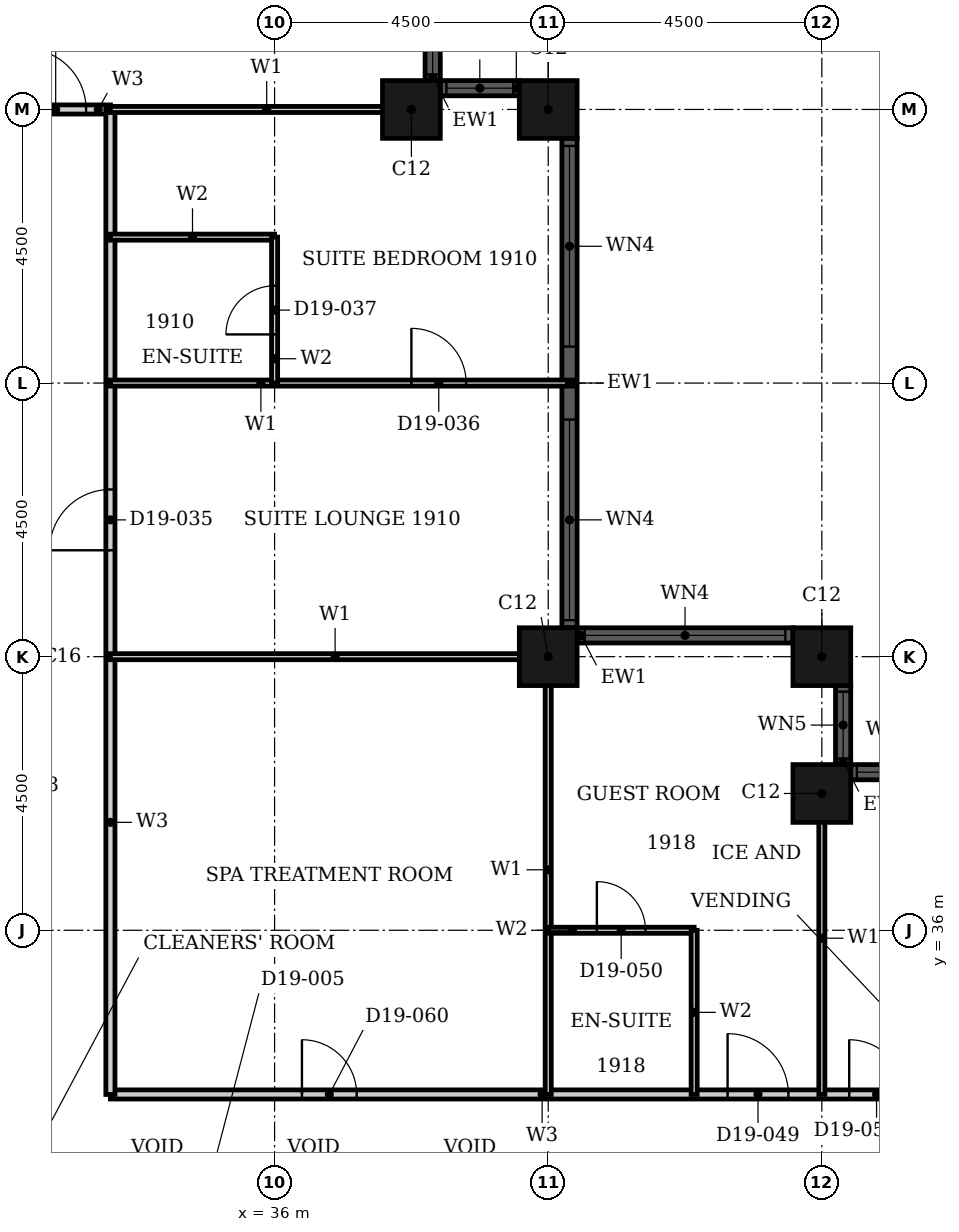
"""IFC4 building model, lengths in metres.
Left out: names, types, materials, properties, quantities, classifications, styles, units other than length and angle.
Written with IfcOpenShell. Run it as: python <this file> out.ifc"""

import sys

from ifc_helpers import new_model, si_unit, direction, frame, frame_2d, origin, origin_2d, place, context, subcontext, project, spatial, rectangle, hollow_rectangle, extrude, element, fill, save


model = new_model("IFC4")
c1 = context("Model", 3, precision=1e-05, world=origin(), true_north=direction((0.0, 1.0)))
c2 = subcontext(c1, "Body", "Model", "MODEL_VIEW")
j1 = project(units=[si_unit("LENGTHUNIT", "METRE"), si_unit("PLANEANGLEUNIT", "RADIAN")], contexts=[c1])
p1 = place(None, origin())
s1 = spatial("IfcSite", under=j1, at=p1, CompositionType="ELEMENT")
p2 = place(p1, origin())
s2 = spatial("IfcBuilding", under=s1, at=p2, CompositionType="ELEMENT")
p3 = place(p2, frame((0.0, 0.0, 81.6)))
s3 = spatial("IfcBuildingStorey", under=s2, at=p3, CompositionType="ELEMENT", Elevation=81.6)
for number, where, z_axis, x_axis in (
    (1, (45.0, 38.25, 0.0), (0.0, 0.0, 1.0), (1.0, 0.0, 0.0)),
    (2, (45.0, 40.5, 0.0), (0.0, 0.0, 1.0), (1.0, 0.0, 0.0)),
    (3, (40.5, 40.5, 0.0), (0.0, 0.0, 1.0), (1.0, 0.0, 0.0)),
    (4, (40.5, 49.5, 0.0), (0.0, 0.0, 1.0), (1.0, 0.0, 0.0)),
    (5, (38.25, 49.5, 0.0), (0.0, 0.0, 1.0), (1.0, 0.0, 0.0)),
):
    element("IfcColumn", number, at=place(p3, frame(where, z_axis=z_axis, x_axis=x_axis)), inside=s3, PredefinedType="COLUMN", context=c2, shape_type="SweptSolid", body=[
        extrude(hollow_rectangle(XDim=0.95, YDim=0.95, WallThickness=0.03, at=origin_2d()), origin(), (0.0, 0.0, 1.0), 3.6),
    ])
p4 = place(p3, frame((46.775, 38.6, 0.0), z_axis=(0.0, 0.0, 1.0), x_axis=(-1.0, 0.0, 0.0)))
e6 = element("IfcWall", 6, at=p4, inside=s3, PredefinedType="SOLIDWALL", context=c2, shape_type="SweptSolid", body=[
    extrude(rectangle(XDim=1.3, YDim=0.25, at=frame_2d((0.65, 0.0))), origin(), (0.0, 0.0, 1.0), 3.6),
])
p5 = place(p4, frame((0.1, 0.0, 0.9)))
e7 = element("IfcOpeningElement", 7, at=p5, cuts=e6, PredefinedType="OPENING", context=c2, shape_type="SweptSolid", body=[
    extrude(rectangle(XDim=1.1, YDim=2.08, at=frame_2d((0.55, 1.04))), frame((0.0, 0.135, 0.0), z_axis=(0.0, -1.0, 0.0), x_axis=(1.0, 0.0, 0.0)), (0.0, 0.0, 1.0), 0.27),
])
p6 = place(p3, frame((45.35, 38.725, 0.0), z_axis=(0.0, 0.0, 1.0), x_axis=(0.0, 1.0, 0.0)))
e8 = element("IfcWall", 8, at=p6, inside=s3, PredefinedType="SOLIDWALL", context=c2, shape_type="SweptSolid", body=[
    extrude(rectangle(XDim=1.3, YDim=0.25, at=frame_2d((0.65, 0.0))), origin(), (0.0, 0.0, 1.0), 3.6),
])
p7 = place(p6, frame((0.1, 0.0, 0.9)))
e9 = element("IfcOpeningElement", 9, at=p7, cuts=e8, PredefinedType="OPENING", context=c2, shape_type="SweptSolid", body=[
    extrude(rectangle(XDim=1.1, YDim=2.08, at=frame_2d((0.55, 1.04))), frame((0.0, 0.135, 0.0), z_axis=(0.0, -1.0, 0.0), x_axis=(1.0, 0.0, 0.0)), (0.0, 0.0, 1.0), 0.27),
])
p8 = place(p3, frame((44.525, 40.85, 0.0), z_axis=(0.0, 0.0, 1.0), x_axis=(-1.0, 0.0, 0.0)))
e10 = element("IfcWall", 10, at=p8, inside=s3, PredefinedType="SOLIDWALL", context=c2, shape_type="SweptSolid", body=[
    extrude(rectangle(XDim=3.55, YDim=0.25, at=frame_2d((1.775, 0.0))), origin(), (0.0, 0.0, 1.0), 3.6),
])
p9 = place(p8, frame((0.125, 0.0, 0.9)))
e11 = element("IfcOpeningElement", 11, at=p9, cuts=e10, PredefinedType="OPENING", context=c2, shape_type="SweptSolid", body=[
    extrude(rectangle(XDim=3.3, YDim=2.08, at=frame_2d((1.65, 1.04))), frame((0.0, 0.135, 0.0), z_axis=(0.0, -1.0, 0.0), x_axis=(1.0, 0.0, 0.0)), (0.0, 0.0, 1.0), 0.27),
])
p10 = place(p3, frame((40.85, 40.975, 0.0), z_axis=(0.0, 0.0, 1.0), x_axis=(0.0, 1.0, 0.0)))
e12 = element("IfcWall", 12, at=p10, inside=s3, PredefinedType="SOLIDWALL", context=c2, shape_type="SweptSolid", body=[
    extrude(rectangle(XDim=8.05, YDim=0.25, at=frame_2d((4.025, 0.0))), origin(), (0.0, 0.0, 1.0), 3.6),
])
p11 = place(p10, frame((0.125, 0.0, 0.9)))
e13 = element("IfcOpeningElement", 13, at=p11, cuts=e12, PredefinedType="OPENING", context=c2, shape_type="SweptSolid", body=[
    extrude(rectangle(XDim=3.3, YDim=2.08, at=frame_2d((1.65, 1.04))), frame((0.0, 0.135, 0.0), z_axis=(0.0, -1.0, 0.0), x_axis=(1.0, 0.0, 0.0)), (0.0, 0.0, 1.0), 0.27),
])
p12 = place(p10, frame((4.625, 0.0, 0.9)))
e14 = element("IfcOpeningElement", 14, at=p12, cuts=e12, PredefinedType="OPENING", context=c2, shape_type="SweptSolid", body=[
    extrude(rectangle(XDim=3.3, YDim=2.08, at=frame_2d((1.65, 1.04))), frame((0.0, 0.135, 0.0), z_axis=(0.0, -1.0, 0.0), x_axis=(1.0, 0.0, 0.0)), (0.0, 0.0, 1.0), 0.27),
])
p13 = place(p3, frame((40.025, 49.85, 0.0), z_axis=(0.0, 0.0, 1.0), x_axis=(-1.0, 0.0, 0.0)))
e15 = element("IfcWall", 15, at=p13, inside=s3, PredefinedType="SOLIDWALL", context=c2, shape_type="SweptSolid", body=[
    extrude(rectangle(XDim=1.3, YDim=0.25, at=frame_2d((0.65, 0.0))), origin(), (0.0, 0.0, 1.0), 3.6),
])
p14 = place(p13, frame((0.1, 0.0, 0.9)))
e16 = element("IfcOpeningElement", 16, at=p14, cuts=e15, PredefinedType="OPENING", context=c2, shape_type="SweptSolid", body=[
    extrude(rectangle(XDim=1.1, YDim=2.08, at=frame_2d((0.55, 1.04))), frame((0.0, 0.135, 0.0), z_axis=(0.0, -1.0, 0.0), x_axis=(1.0, 0.0, 0.0)), (0.0, 0.0, 1.0), 0.27),
])
p15 = place(p3, frame((38.6, 49.975, 0.0), z_axis=(0.0, 0.0, 1.0), x_axis=(0.0, 1.0, 0.0)))
e17 = element("IfcWall", 17, at=p15, inside=s3, PredefinedType="SOLIDWALL", context=c2, shape_type="SweptSolid", body=[
    extrude(rectangle(XDim=1.3, YDim=0.25, at=frame_2d((0.65, 0.0))), origin(), (0.0, 0.0, 1.0), 3.6),
])
p16 = place(p15, frame((0.1, 0.0, 0.9)))
e18 = element("IfcOpeningElement", 18, at=p16, cuts=e17, PredefinedType="OPENING", context=c2, shape_type="SweptSolid", body=[
    extrude(rectangle(XDim=1.1, YDim=2.08, at=frame_2d((0.55, 1.04))), frame((0.0, 0.135, 0.0), z_axis=(0.0, -1.0, 0.0), x_axis=(1.0, 0.0, 0.0)), (0.0, 0.0, 1.0), 0.27),
])
p17 = place(p3, frame((33.3, 33.3, 0.0), z_axis=(0.0, 0.0, 1.0), x_axis=(1.0, 0.0, 0.0)))
e19 = element("IfcWall", 19, at=p17, inside=s3, PredefinedType="PARTITIONING", context=c2, shape_type="SweptSolid", body=[
    extrude(rectangle(XDim=13.5, YDim=0.15, at=frame_2d((6.75, 0.0))), origin(), (0.0, 0.0, 1.0), 3.3),
])
p18 = place(p17, frame((10.15, 0.0, 0.0)))
e20 = element("IfcOpeningElement", 20, at=p18, cuts=e19, PredefinedType="OPENING", context=c2, shape_type="SweptSolid", body=[
    extrude(rectangle(XDim=1.0, YDim=2.1, at=frame_2d((0.5, 1.05))), frame((0.0, 0.085, 0.0), z_axis=(0.0, -1.0, 0.0), x_axis=(1.0, 0.0, 0.0)), (0.0, 0.0, 1.0), 0.17),
])
p19 = place(p17, frame((12.15, 0.0, 0.0)))
e21 = element("IfcOpeningElement", 21, at=p19, cuts=e19, PredefinedType="OPENING", context=c2, shape_type="SweptSolid", body=[
    extrude(rectangle(XDim=0.9, YDim=2.1, at=frame_2d((0.45, 1.05))), frame((0.0, 0.085, 0.0), z_axis=(0.0, -1.0, 0.0), x_axis=(1.0, 0.0, 0.0)), (0.0, 0.0, 1.0), 0.17),
])
p20 = place(p17, frame((3.15, 0.0, 0.0)))
e22 = element("IfcOpeningElement", 22, at=p20, cuts=e19, PredefinedType="OPENING", context=c2, shape_type="SweptSolid", body=[
    extrude(rectangle(XDim=0.9, YDim=2.1, at=frame_2d((0.45, 1.05))), frame((0.0, 0.085, 0.0), z_axis=(0.0, -1.0, 0.0), x_axis=(1.0, 0.0, 0.0)), (0.0, 0.0, 1.0), 0.17),
])
p21 = place(p3, frame((31.5, 49.5, 0.0), z_axis=(0.0, 0.0, 1.0), x_axis=(1.0, 0.0, 0.0)))
e23 = element("IfcWall", 23, at=p21, inside=s3, PredefinedType="PARTITIONING", context=c2, shape_type="SweptSolid", body=[
    extrude(rectangle(XDim=1.8, YDim=0.15, at=frame_2d((0.9, 0.0))), origin(), (0.0, 0.0, 1.0), 3.3),
])
p22 = place(p21, frame((0.4, 0.0, 0.0)))
e24 = element("IfcOpeningElement", 24, at=p22, cuts=e23, PredefinedType="OPENING", context=c2, shape_type="SweptSolid", body=[
    extrude(rectangle(XDim=1.0, YDim=2.1, at=frame_2d((0.5, 1.05))), frame((0.0, 0.085, 0.0), z_axis=(0.0, -1.0, 0.0), x_axis=(1.0, 0.0, 0.0)), (0.0, 0.0, 1.0), 0.17),
])
p23 = place(p3, frame((33.3, 33.3, 0.0), z_axis=(0.0, 0.0, 1.0), x_axis=(0.0, 1.0, 0.0)))
e25 = element("IfcWall", 25, at=p23, inside=s3, PredefinedType="PARTITIONING", context=c2, shape_type="SweptSolid", body=[
    extrude(rectangle(XDim=16.2, YDim=0.15, at=frame_2d((8.1, 0.0))), origin(), (0.0, 0.0, 1.0), 3.3),
])
p24 = place(p23, frame((8.95, 0.0, 0.0)))
e26 = element("IfcOpeningElement", 26, at=p24, cuts=e25, PredefinedType="OPENING", context=c2, shape_type="SweptSolid", body=[
    extrude(rectangle(XDim=1.0, YDim=2.1, at=frame_2d((0.5, 1.05))), frame((0.0, 0.085, 0.0), z_axis=(0.0, -1.0, 0.0), x_axis=(1.0, 0.0, 0.0)), (0.0, 0.0, 1.0), 0.17),
])
p25 = place(p3, frame((33.3, 40.5, 0.0), z_axis=(0.0, 0.0, 1.0), x_axis=(1.0, 0.0, 0.0)))
e27 = element("IfcWall", 27, at=p25, inside=s3, PredefinedType="PARTITIONING", context=c2, shape_type="SweptSolid", body=[
    extrude(rectangle(XDim=7.39, YDim=0.1, at=frame_2d((3.695, 0.0))), origin(), (0.0, 0.0, 1.0), 2.38),
])
p26 = place(p3, frame((33.3, 45.0, 0.0), z_axis=(0.0, 0.0, 1.0), x_axis=(1.0, 0.0, 0.0)))
e28 = element("IfcWall", 28, at=p26, inside=s3, PredefinedType="PARTITIONING", context=c2, shape_type="SweptSolid", body=[
    extrude(rectangle(XDim=7.615, YDim=0.1, at=frame_2d((3.808, 0.0))), origin(), (0.0, 0.0, 1.0), 3.3),
])
p27 = place(p26, frame((4.95, 0.0, 0.0)))
e29 = element("IfcOpeningElement", 29, at=p27, cuts=e28, PredefinedType="OPENING", context=c2, shape_type="SweptSolid", body=[
    extrude(rectangle(XDim=0.9, YDim=2.1, at=frame_2d((0.45, 1.05))), frame((0.0, 0.06, 0.0), z_axis=(0.0, -1.0, 0.0), x_axis=(1.0, 0.0, 0.0)), (0.0, 0.0, 1.0), 0.12),
])
p28 = place(p3, frame((33.3, 49.5, 0.0), z_axis=(0.0, 0.0, 1.0), x_axis=(1.0, 0.0, 0.0)))
e30 = element("IfcWall", 30, at=p28, inside=s3, PredefinedType="PARTITIONING", context=c2, shape_type="SweptSolid", body=[
    extrude(rectangle(XDim=5.14, YDim=0.1, at=frame_2d((2.57, 0.0))), origin(), (0.0, 0.0, 1.0), 3.3),
])
p29 = place(p3, frame((40.5, 33.3, 0.0), z_axis=(0.0, 0.0, 1.0), x_axis=(0.0, 1.0, 0.0)))
e31 = element("IfcWall", 31, at=p29, inside=s3, PredefinedType="PARTITIONING", context=c2, shape_type="SweptSolid", body=[
    extrude(rectangle(XDim=7.39, YDim=0.1, at=frame_2d((3.695, 0.0))), origin(), (0.0, 0.0, 1.0), 3.3),
])
p30 = place(p3, frame((45.0, 33.3, 0.0), z_axis=(0.0, 0.0, 1.0), x_axis=(0.0, 1.0, 0.0)))
e32 = element("IfcWall", 32, at=p30, inside=s3, PredefinedType="PARTITIONING", context=c2, shape_type="SweptSolid", body=[
    extrude(rectangle(XDim=5.14, YDim=0.1, at=frame_2d((2.57, 0.0))), origin(), (0.0, 0.0, 1.0), 3.3),
])
p31 = place(p3, frame((40.5, 36.0, 0.0), z_axis=(0.0, 0.0, 1.0), x_axis=(1.0, 0.0, 0.0)))
e33 = element("IfcWall", 33, at=p31, inside=s3, PredefinedType="PARTITIONING", context=c2, shape_type="SweptSolid", body=[
    extrude(rectangle(XDim=2.4, YDim=0.1, at=frame_2d((1.2, 0.0))), origin(), (0.0, 0.0, 1.0), 3.3),
])
p32 = place(p31, frame((0.8, 0.0, 0.0)))
e34 = element("IfcOpeningElement", 34, at=p32, cuts=e33, PredefinedType="OPENING", context=c2, shape_type="SweptSolid", body=[
    extrude(rectangle(XDim=0.8, YDim=2.1, at=frame_2d((0.4, 1.05))), frame((0.0, 0.06, 0.0), z_axis=(0.0, -1.0, 0.0), x_axis=(1.0, 0.0, 0.0)), (0.0, 0.0, 1.0), 0.12),
])
p33 = place(p3, frame((33.3, 47.4, 0.0), z_axis=(0.0, 0.0, 1.0), x_axis=(1.0, 0.0, 0.0)))
e35 = element("IfcWall", 35, at=p33, inside=s3, PredefinedType="PARTITIONING", context=c2, shape_type="SweptSolid", body=[
    extrude(rectangle(XDim=2.7, YDim=0.1, at=frame_2d((1.35, 0.0))), origin(), (0.0, 0.0, 1.0), 3.3),
])
p34 = place(p3, frame((36.0, 45.0, 0.0), z_axis=(0.0, 0.0, 1.0), x_axis=(0.0, 1.0, 0.0)))
e36 = element("IfcWall", 36, at=p34, inside=s3, PredefinedType="PARTITIONING", context=c2, shape_type="SweptSolid", body=[
    extrude(rectangle(XDim=2.4, YDim=0.1, at=frame_2d((1.2, 0.0))), origin(), (0.0, 0.0, 1.0), 2.58),
])
p35 = place(p34, frame((0.8, 0.0, 0.0)))
e37 = element("IfcOpeningElement", 37, at=p35, cuts=e36, PredefinedType="OPENING", context=c2, shape_type="SweptSolid", body=[
    extrude(rectangle(XDim=0.8, YDim=2.1, at=frame_2d((0.4, 1.05))), frame((0.0, 0.06, 0.0), z_axis=(0.0, -1.0, 0.0), x_axis=(1.0, 0.0, 0.0)), (0.0, 0.0, 1.0), 0.12),
])
p36 = place(p3, frame((42.9, 33.3, 0.0), z_axis=(0.0, 0.0, 1.0), x_axis=(0.0, 1.0, 0.0)))
e38 = element("IfcWall", 38, at=p36, inside=s3, PredefinedType="PARTITIONING", context=c2, shape_type="SweptSolid", body=[
    extrude(rectangle(XDim=2.7, YDim=0.1, at=frame_2d((1.35, 0.0))), origin(), (0.0, 0.0, 1.0), 3.3),
])
p37 = place(p5, origin())
e39 = element("IfcWindow", 39, at=p37, inside=s3, PartitioningType="SINGLE_PANEL", PredefinedType="WINDOW", context=c2, shape_type="SweptSolid", body=[
    extrude(rectangle(XDim=1.1, YDim=2.08, at=frame_2d((0.55, 1.04))), frame((0.0, 0.03, 0.0), z_axis=(0.0, -1.0, 0.0), x_axis=(1.0, 0.0, 0.0)), (0.0, 0.0, 1.0), 0.06),
])
fill(e7, e39)
p38 = place(p7, origin())
e40 = element("IfcWindow", 40, at=p38, inside=s3, PartitioningType="SINGLE_PANEL", PredefinedType="WINDOW", context=c2, shape_type="SweptSolid", body=[
    extrude(rectangle(XDim=1.1, YDim=2.08, at=frame_2d((0.55, 1.04))), frame((0.0, 0.03, 0.0), z_axis=(0.0, -1.0, 0.0), x_axis=(1.0, 0.0, 0.0)), (0.0, 0.0, 1.0), 0.06),
])
fill(e9, e40)
p39 = place(p9, origin())
e41 = element("IfcWindow", 41, at=p39, inside=s3, PartitioningType="SINGLE_PANEL", PredefinedType="WINDOW", context=c2, shape_type="SweptSolid", body=[
    extrude(rectangle(XDim=3.3, YDim=2.08, at=frame_2d((1.65, 1.04))), frame((0.0, 0.03, 0.0), z_axis=(0.0, -1.0, 0.0), x_axis=(1.0, 0.0, 0.0)), (0.0, 0.0, 1.0), 0.06),
])
fill(e11, e41)
p40 = place(p11, origin())
e42 = element("IfcWindow", 42, at=p40, inside=s3, PartitioningType="SINGLE_PANEL", PredefinedType="WINDOW", context=c2, shape_type="SweptSolid", body=[
    extrude(rectangle(XDim=3.3, YDim=2.08, at=frame_2d((1.65, 1.04))), frame((0.0, 0.03, 0.0), z_axis=(0.0, -1.0, 0.0), x_axis=(1.0, 0.0, 0.0)), (0.0, 0.0, 1.0), 0.06),
])
fill(e13, e42)
p41 = place(p12, origin())
e43 = element("IfcWindow", 43, at=p41, inside=s3, PartitioningType="SINGLE_PANEL", PredefinedType="WINDOW", context=c2, shape_type="SweptSolid", body=[
    extrude(rectangle(XDim=3.3, YDim=2.08, at=frame_2d((1.65, 1.04))), frame((0.0, 0.03, 0.0), z_axis=(0.0, -1.0, 0.0), x_axis=(1.0, 0.0, 0.0)), (0.0, 0.0, 1.0), 0.06),
])
fill(e14, e43)
p42 = place(p14, origin())
e44 = element("IfcWindow", 44, at=p42, inside=s3, PartitioningType="SINGLE_PANEL", PredefinedType="WINDOW", context=c2, shape_type="SweptSolid", body=[
    extrude(rectangle(XDim=1.1, YDim=2.08, at=frame_2d((0.55, 1.04))), frame((0.0, 0.03, 0.0), z_axis=(0.0, -1.0, 0.0), x_axis=(1.0, 0.0, 0.0)), (0.0, 0.0, 1.0), 0.06),
])
fill(e16, e44)
p43 = place(p16, origin())
e45 = element("IfcWindow", 45, at=p43, inside=s3, PartitioningType="SINGLE_PANEL", PredefinedType="WINDOW", context=c2, shape_type="SweptSolid", body=[
    extrude(rectangle(XDim=1.1, YDim=2.08, at=frame_2d((0.55, 1.04))), frame((0.0, 0.03, 0.0), z_axis=(0.0, -1.0, 0.0), x_axis=(1.0, 0.0, 0.0)), (0.0, 0.0, 1.0), 0.06),
])
fill(e18, e45)
p44 = place(p24, origin())
e46 = element("IfcDoor", 46, at=p44, inside=s3, OperationType="SINGLE_SWING_RIGHT", PredefinedType="DOOR", context=c2, shape_type="SweptSolid", body=[
    extrude(rectangle(XDim=1.0, YDim=2.1, at=frame_2d((0.5, 1.05))), frame((0.0, 0.025, 0.0), z_axis=(0.0, -1.0, 0.0), x_axis=(1.0, 0.0, 0.0)), (0.0, 0.0, 1.0), 0.05),
])
fill(e26, e46)
p45 = place(p27, origin())
e47 = element("IfcDoor", 47, at=p45, inside=s3, OperationType="SINGLE_SWING_RIGHT", PredefinedType="DOOR", context=c2, shape_type="SweptSolid", body=[
    extrude(rectangle(XDim=0.9, YDim=2.1, at=frame_2d((0.45, 1.05))), frame((0.0, 0.025, 0.0), z_axis=(0.0, -1.0, 0.0), x_axis=(1.0, 0.0, 0.0)), (0.0, 0.0, 1.0), 0.05),
])
fill(e29, e47)
p46 = place(p35, origin())
e48 = element("IfcDoor", 48, at=p46, inside=s3, OperationType="SINGLE_SWING_RIGHT", PredefinedType="DOOR", context=c2, shape_type="SweptSolid", body=[
    extrude(rectangle(XDim=0.8, YDim=2.1, at=frame_2d((0.4, 1.05))), frame((0.0, 0.025, 0.0), z_axis=(0.0, -1.0, 0.0), x_axis=(1.0, 0.0, 0.0)), (0.0, 0.0, 1.0), 0.05),
])
fill(e37, e48)
p47 = place(p22, origin())
e49 = element("IfcDoor", 49, at=p47, inside=s3, OperationType="SINGLE_SWING_LEFT", PredefinedType="DOOR", context=c2, shape_type="SweptSolid", body=[
    extrude(rectangle(XDim=1.0, YDim=2.1, at=frame_2d((0.5, 1.05))), frame((0.0, 0.025, 0.0), z_axis=(0.0, -1.0, 0.0), x_axis=(1.0, 0.0, 0.0)), (0.0, 0.0, 1.0), 0.05),
])
fill(e24, e49)
p48 = place(p18, origin())
e50 = element("IfcDoor", 50, at=p48, inside=s3, OperationType="SINGLE_SWING_RIGHT", PredefinedType="DOOR", context=c2, shape_type="SweptSolid", body=[
    extrude(rectangle(XDim=1.0, YDim=2.1, at=frame_2d((0.5, 1.05))), frame((0.0, 0.025, 0.0), z_axis=(0.0, -1.0, 0.0), x_axis=(1.0, 0.0, 0.0)), (0.0, 0.0, 1.0), 0.05),
])
fill(e20, e50)
p49 = place(p32, origin())
e51 = element("IfcDoor", 51, at=p49, inside=s3, OperationType="SINGLE_SWING_RIGHT", PredefinedType="DOOR", context=c2, shape_type="SweptSolid", body=[
    extrude(rectangle(XDim=0.8, YDim=2.1, at=frame_2d((0.4, 1.05))), frame((0.0, 0.025, 0.0), z_axis=(0.0, -1.0, 0.0), x_axis=(1.0, 0.0, 0.0)), (0.0, 0.0, 1.0), 0.05),
])
fill(e34, e51)
p50 = place(p19, origin())
e52 = element("IfcDoor", 52, at=p50, inside=s3, OperationType="SINGLE_SWING_RIGHT", PredefinedType="DOOR", context=c2, shape_type="SweptSolid", body=[
    extrude(rectangle(XDim=0.9, YDim=2.1, at=frame_2d((0.45, 1.05))), frame((0.0, 0.025, 0.0), z_axis=(0.0, -1.0, 0.0), x_axis=(1.0, 0.0, 0.0)), (0.0, 0.0, 1.0), 0.05),
])
fill(e21, e52)
p51 = place(p20, origin())
e53 = element("IfcDoor", 53, at=p51, inside=s3, OperationType="SINGLE_SWING_RIGHT", PredefinedType="DOOR", context=c2, shape_type="SweptSolid", body=[
    extrude(rectangle(XDim=0.9, YDim=2.1, at=frame_2d((0.45, 1.05))), frame((0.0, 0.025, 0.0), z_axis=(0.0, -1.0, 0.0), x_axis=(1.0, 0.0, 0.0)), (0.0, 0.0, 1.0), 0.05),
])
fill(e22, e53)
save(model, sys.argv[1])
